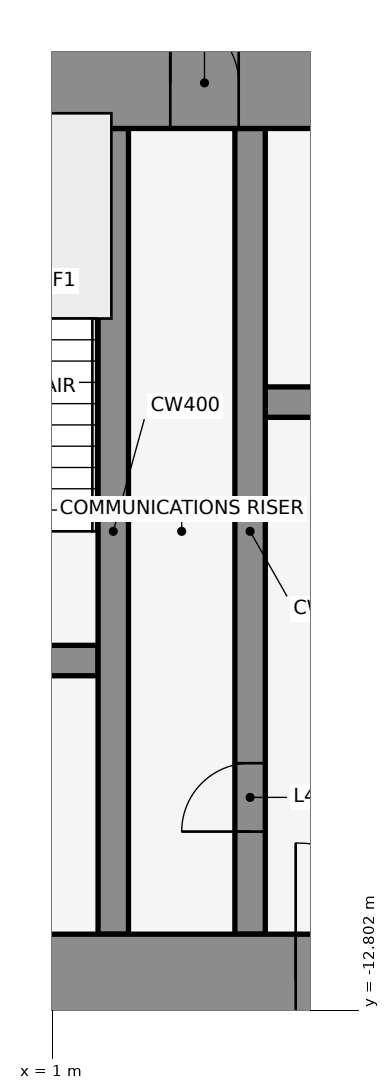
"""IFC4 building model, lengths in metres.
Left out: names, types, materials, properties, quantities, classifications, styles, units other than length and angle.
Written with IfcOpenShell. Run it as: python <this file> out.ifc"""

import sys

from ifc_helpers import new_model, si_unit, direction, frame, frame_2d, origin, place, context, subcontext, project, spatial, rectangle, extrude, element, fill, save


model = new_model("IFC4")
c1 = context("Model", 3, precision=1e-05, world=origin(), true_north=direction((0.0, 1.0)))
c2 = subcontext(c1, "Body", "Model", "MODEL_VIEW")
j1 = project(units=[si_unit("LENGTHUNIT", "METRE"), si_unit("PLANEANGLEUNIT", "RADIAN")], contexts=[c1])
p1 = place(None, origin())
s1 = spatial("IfcSite", under=j1, at=p1, CompositionType="ELEMENT")
p2 = place(p1, origin())
s2 = spatial("IfcBuilding", under=s1, at=p2, CompositionType="ELEMENT")
p3 = place(p2, frame((0.0, 0.0, 195.0)))
s3 = spatial("IfcBuildingStorey", under=s2, at=p3, CompositionType="ELEMENT", Elevation=195.0)
p4 = place(p3, frame((1.901, 1.08, 0.0), z_axis=(0.0, 0.0, 1.0), x_axis=(-0.83981312244, -0.542875602121, 0.0)))
e1 = element("IfcWall", 1, at=p4, inside=s3, PredefinedType="STANDARD", context=c2, shape_type="SweptSolid", body=[
    extrude(rectangle(XDim=2.183, YDim=0.25, at=frame_2d((1.091, 0.0))), origin(), (0.0, 0.0, 1.0), 3.95),
])
p5 = place(p3, frame((-1.6, -8.2, 0.0), z_axis=(0.0, 0.0, 1.0), x_axis=(1.0, 0.0, 0.0)))
e2 = element("IfcWall", 2, at=p5, inside=s3, PredefinedType="SHEAR", context=c2, shape_type="SweptSolid", body=[
    extrude(rectangle(XDim=3.2, YDim=0.4, at=frame_2d((1.6, 0.0))), origin(), (0.0, 0.0, 1.0), 4.1),
])
p6 = place(p5, frame((1.05, 0.0, 0.0)))
e3 = element("IfcOpeningElement", 3, at=p6, cuts=e2, PredefinedType="OPENING", context=c2, shape_type="SweptSolid", body=[
    extrude(rectangle(XDim=1.2, YDim=2.1, at=frame_2d((0.6, 1.05))), frame((0.0, 0.212, 0.0), z_axis=(0.0, -1.0, 0.0), x_axis=(1.0, 0.0, 0.0)), (0.0, 0.0, 1.0), 0.424),
])
p7 = place(p3, frame((3.8, -4.8, 0.0), z_axis=(0.0, 0.0, 1.0), x_axis=(1.0, 0.0, 0.0)))
e4 = element("IfcWall", 4, at=p7, inside=s3, PredefinedType="SHEAR", context=c2, shape_type="SweptSolid", body=[
    extrude(rectangle(XDim=13.6, YDim=0.4, at=frame_2d((6.8, 0.0))), origin(), (0.0, 0.0, 1.0), 4.1),
])
p8 = place(p7, frame((9.45, 0.0, 0.0)))
e5 = element("IfcOpeningElement", 5, at=p8, cuts=e4, PredefinedType="OPENING", context=c2, shape_type="SweptSolid", body=[
    extrude(rectangle(XDim=1.1, YDim=2.1, at=frame_2d((0.55, 1.05))), frame((0.0, 0.212, 0.0), z_axis=(0.0, -1.0, 0.0), x_axis=(1.0, 0.0, 0.0)), (0.0, 0.0, 1.0), 0.424),
])
p9 = place(p7, frame((11.85, 0.0, 0.0)))
e6 = element("IfcOpeningElement", 6, at=p9, cuts=e4, PredefinedType="OPENING", context=c2, shape_type="SweptSolid", body=[
    extrude(rectangle(XDim=1.1, YDim=2.1, at=frame_2d((0.55, 1.05))), frame((0.0, 0.212, 0.0), z_axis=(0.0, -1.0, 0.0), x_axis=(1.0, 0.0, 0.0)), (0.0, 0.0, 1.0), 0.424),
])
p10 = place(p7, frame((0.95, 0.0, 0.0)))
e7 = element("IfcOpeningElement", 7, at=p10, cuts=e4, PredefinedType="OPENING", context=c2, shape_type="SweptSolid", body=[
    extrude(rectangle(XDim=0.9, YDim=2.1, at=frame_2d((0.45, 1.05))), frame((0.0, 0.212, 0.0), z_axis=(0.0, -1.0, 0.0), x_axis=(1.0, 0.0, 0.0)), (0.0, 0.0, 1.0), 0.424),
])
p11 = place(p7, frame((5.35, 0.0, 0.0)))
e8 = element("IfcOpeningElement", 8, at=p11, cuts=e4, PredefinedType="OPENING", context=c2, shape_type="SweptSolid", body=[
    extrude(rectangle(XDim=0.9, YDim=2.1, at=frame_2d((0.45, 1.05))), frame((0.0, 0.212, 0.0), z_axis=(0.0, -1.0, 0.0), x_axis=(1.0, 0.0, 0.0)), (0.0, 0.0, 1.0), 0.424),
])
p12 = place(p3, frame((1.8, -11.8, 0.0), z_axis=(0.0, 0.0, 1.0), x_axis=(0.0, 1.0, 0.0)))
e9 = element("IfcWall", 9, at=p12, inside=s3, PredefinedType="SHEAR", context=c2, shape_type="SweptSolid", body=[
    extrude(rectangle(XDim=10.6, YDim=0.4, at=frame_2d((5.3, 0.0))), origin(), (0.0, 0.0, 1.0), 4.1),
])
p13 = place(p3, frame((3.6, -11.8, 0.0), z_axis=(0.0, 0.0, 1.0), x_axis=(0.0, 1.0, 0.0)))
e10 = element("IfcWall", 10, at=p13, inside=s3, PredefinedType="SHEAR", context=c2, shape_type="SweptSolid", body=[
    extrude(rectangle(XDim=10.6, YDim=0.4, at=frame_2d((5.3, 0.0))), origin(), (0.0, 0.0, 1.0), 4.1),
])
p14 = place(p13, frame((1.35, 0.0, 0.0)))
e11 = element("IfcOpeningElement", 11, at=p14, cuts=e10, PredefinedType="OPENING", context=c2, shape_type="SweptSolid", body=[
    extrude(rectangle(XDim=0.9, YDim=2.1, at=frame_2d((0.45, 1.05))), frame((0.0, 0.212, 0.0), z_axis=(0.0, -1.0, 0.0), x_axis=(1.0, 0.0, 0.0)), (0.0, 0.0, 1.0), 0.424),
])
p15 = place(p3, frame((-22.0, -0.6, 0.0), z_axis=(0.0, 0.0, 1.0), x_axis=(1.0, 0.0, 0.0)))
e12 = element("IfcWall", 12, at=p15, inside=s3, PredefinedType="SHEAR", context=c2, shape_type="SweptSolid", body=[
    extrude(rectangle(XDim=44.0, YDim=1.2, at=frame_2d((22.0, 0.0))), origin(), (0.0, 0.0, 1.0), 4.1),
])
p16 = place(p15, frame((18.55, 0.0, 0.0)))
e13 = element("IfcOpeningElement", 13, at=p16, cuts=e12, PredefinedType="OPENING", context=c2, shape_type="SweptSolid", body=[
    extrude(rectangle(XDim=0.9, YDim=2.1, at=frame_2d((0.45, 1.05))), frame((0.0, 0.612, 0.0), z_axis=(0.0, -1.0, 0.0), x_axis=(1.0, 0.0, 0.0)), (0.0, 0.0, 1.0), 1.224),
])
p17 = place(p15, frame((24.55, 0.0, 0.0)))
e14 = element("IfcOpeningElement", 14, at=p17, cuts=e12, PredefinedType="OPENING", context=c2, shape_type="SweptSolid", body=[
    extrude(rectangle(XDim=0.9, YDim=2.1, at=frame_2d((0.45, 1.05))), frame((0.0, 0.612, 0.0), z_axis=(0.0, -1.0, 0.0), x_axis=(1.0, 0.0, 0.0)), (0.0, 0.0, 1.0), 1.224),
])
p18 = place(p3, frame((-22.0, -12.4, 0.0), z_axis=(0.0, 0.0, 1.0), x_axis=(1.0, 0.0, 0.0)))
e15 = element("IfcWall", 15, at=p18, inside=s3, PredefinedType="SHEAR", context=c2, shape_type="SweptSolid", body=[
    extrude(rectangle(XDim=44.0, YDim=1.2, at=frame_2d((22.0, 0.0))), origin(), (0.0, 0.0, 1.0), 4.1),
])
p19 = place(p18, frame((2.2, 0.0, 0.0)))
e16 = element("IfcOpeningElement", 16, at=p19, cuts=e15, PredefinedType="OPENING", context=c2, shape_type="SweptSolid", body=[
    extrude(rectangle(XDim=1.2, YDim=2.1, at=frame_2d((0.6, 1.05))), frame((0.0, 0.612, 0.0), z_axis=(0.0, -1.0, 0.0), x_axis=(1.0, 0.0, 0.0)), (0.0, 0.0, 1.0), 1.224),
])
p20 = place(p18, frame((21.4, 0.0, 0.0)))
e17 = element("IfcOpeningElement", 17, at=p20, cuts=e15, PredefinedType="OPENING", context=c2, shape_type="SweptSolid", body=[
    extrude(rectangle(XDim=1.2, YDim=2.1, at=frame_2d((0.6, 1.05))), frame((0.0, 0.612, 0.0), z_axis=(0.0, -1.0, 0.0), x_axis=(1.0, 0.0, 0.0)), (0.0, 0.0, 1.0), 1.224),
])
p21 = place(p18, frame((40.6, 0.0, 0.0)))
e18 = element("IfcOpeningElement", 18, at=p21, cuts=e15, PredefinedType="OPENING", context=c2, shape_type="SweptSolid", body=[
    extrude(rectangle(XDim=1.2, YDim=2.1, at=frame_2d((0.6, 1.05))), frame((0.0, 0.612, 0.0), z_axis=(0.0, -1.0, 0.0), x_axis=(1.0, 0.0, 0.0)), (0.0, 0.0, 1.0), 1.224),
])
p22 = place(p18, frame((16.0, 0.0, 0.0)))
e19 = element("IfcOpeningElement", 19, at=p22, cuts=e15, PredefinedType="OPENING", context=c2, shape_type="SweptSolid", body=[
    extrude(rectangle(XDim=1.8, YDim=2.1, at=frame_2d((0.9, 1.05))), frame((0.0, 0.612, 0.0), z_axis=(0.0, -1.0, 0.0), x_axis=(1.0, 0.0, 0.0)), (0.0, 0.0, 1.0), 1.224),
])
p23 = place(p18, frame((6.3, 0.0, 0.0)))
e20 = element("IfcOpeningElement", 20, at=p23, cuts=e15, PredefinedType="OPENING", context=c2, shape_type="SweptSolid", body=[
    extrude(rectangle(XDim=1.2, YDim=2.1, at=frame_2d((0.6, 1.05))), frame((0.0, 0.612, 0.0), z_axis=(0.0, -1.0, 0.0), x_axis=(1.0, 0.0, 0.0)), (0.0, 0.0, 1.0), 1.224),
])
p24 = place(p18, frame((26.2, 0.0, 0.0)))
e21 = element("IfcOpeningElement", 21, at=p24, cuts=e15, PredefinedType="OPENING", context=c2, shape_type="SweptSolid", body=[
    extrude(rectangle(XDim=1.8, YDim=2.1, at=frame_2d((0.9, 1.05))), frame((0.0, 0.612, 0.0), z_axis=(0.0, -1.0, 0.0), x_axis=(1.0, 0.0, 0.0)), (0.0, 0.0, 1.0), 1.224),
])
p25 = place(p18, frame((36.5, 0.0, 0.0)))
e22 = element("IfcOpeningElement", 22, at=p25, cuts=e15, PredefinedType="OPENING", context=c2, shape_type="SweptSolid", body=[
    extrude(rectangle(XDim=1.2, YDim=2.1, at=frame_2d((0.6, 1.05))), frame((0.0, 0.612, 0.0), z_axis=(0.0, -1.0, 0.0), x_axis=(1.0, 0.0, 0.0)), (0.0, 0.0, 1.0), 1.224),
])
p26 = place(p14, origin())
e23 = element("IfcDoor", 23, at=p26, inside=s3, OperationType="SINGLE_SWING_LEFT", PredefinedType="DOOR", context=c2, shape_type="SweptSolid", body=[
    extrude(rectangle(XDim=0.9, YDim=2.1, at=frame_2d((0.45, 1.05))), frame((0.0, 0.025, 0.0), z_axis=(0.0, -1.0, 0.0), x_axis=(1.0, 0.0, 0.0)), (0.0, 0.0, 1.0), 0.05),
])
fill(e11, e23)
p27 = place(p17, origin())
e24 = element("IfcDoor", 24, at=p27, inside=s3, OperationType="SINGLE_SWING_LEFT", PredefinedType="DOOR", context=c2, shape_type="SweptSolid", body=[
    extrude(rectangle(XDim=0.9, YDim=2.1, at=frame_2d((0.45, 1.05))), frame((0.0, 0.025, 0.0), z_axis=(0.0, -1.0, 0.0), x_axis=(1.0, 0.0, 0.0)), (0.0, 0.0, 1.0), 0.05),
])
fill(e14, e24)
p28 = place(p24, origin())
e25 = element("IfcDoor", 25, at=p28, inside=s3, OperationType="SINGLE_SWING_LEFT", PredefinedType="DOOR", context=c2, shape_type="SweptSolid", body=[
    extrude(rectangle(XDim=1.8, YDim=2.1, at=frame_2d((0.9, 1.05))), frame((0.0, 0.025, 0.0), z_axis=(0.0, -1.0, 0.0), x_axis=(1.0, 0.0, 0.0)), (0.0, 0.0, 1.0), 0.05),
])
fill(e21, e25)
save(model, sys.argv[1])
